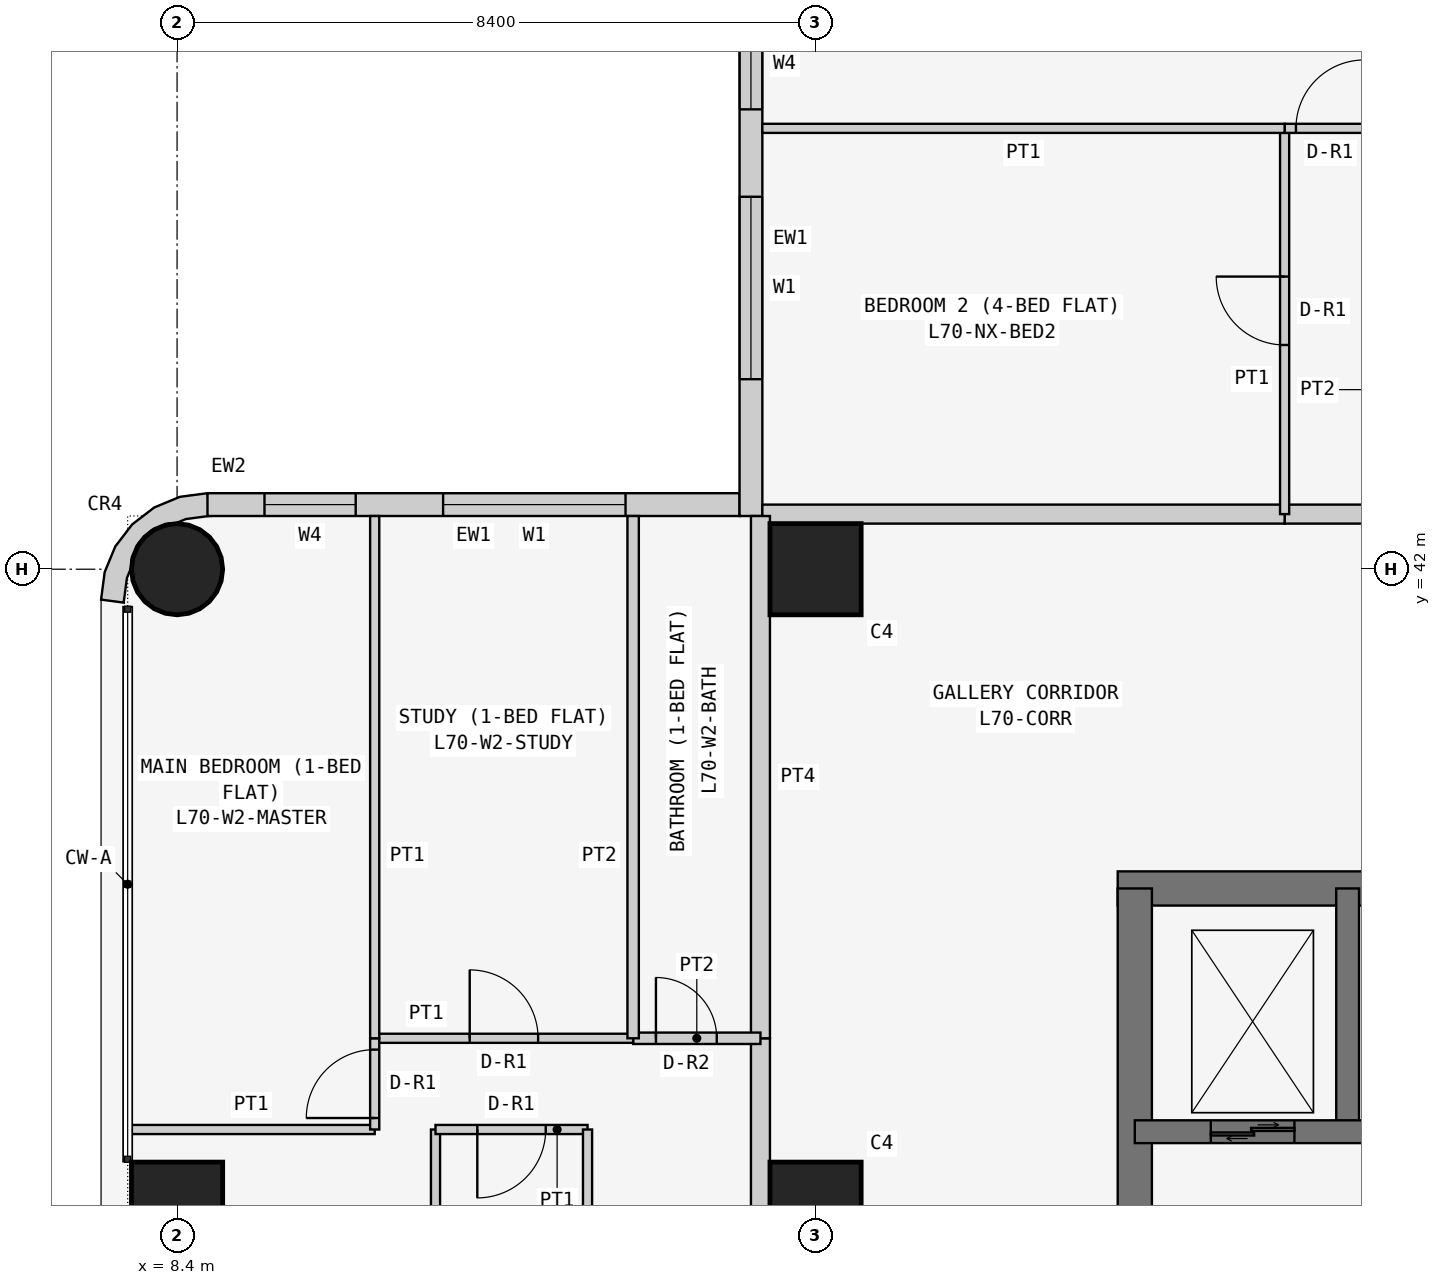
"""IFC4 building model, lengths in metres.
Left out: names, types, materials, properties, quantities, classifications, styles, units other than length and angle.
Written with IfcOpenShell. Run it as: python <this file> out.ifc"""

import sys

from ifc_helpers import new_model, si_unit, direction, frame, frame_2d, origin, origin_2d, place, context, subcontext, project, spatial, polyline, rectangle, circle, outline, extrude, element, fill, save


model = new_model("IFC4")
c1 = context("Model", 3, precision=1e-05, world=origin(), true_north=direction((0.0, 1.0)))
c2 = subcontext(c1, "Body", "Model", "MODEL_VIEW")
j1 = project(units=[si_unit("LENGTHUNIT", "METRE"), si_unit("PLANEANGLEUNIT", "RADIAN")], contexts=[c1])
p1 = place(None, origin())
s1 = spatial("IfcSite", under=j1, at=p1, CompositionType="ELEMENT")
p2 = place(p1, origin())
s2 = spatial("IfcBuilding", under=s1, at=p2, CompositionType="ELEMENT")
p3 = place(p2, frame((0.0, 0.0, 268.5)))
s3 = spatial("IfcBuildingStorey", under=s2, at=p3, CompositionType="ELEMENT", Elevation=268.5)
p4 = place(p3, frame((8.4, 33.6, 0.0), z_axis=(0.0, 0.0, 1.0), x_axis=(1.0, 0.0, 0.0)))
e1 = element("IfcColumn", 1, at=p4, inside=s3, PredefinedType="COLUMN", context=c2, shape_type="SweptSolid", body=[
    extrude(rectangle(XDim=1.2, YDim=1.2, at=origin_2d()), origin(), (0.0, 0.0, 1.0), 3.6),
])
p5 = place(p3, frame((8.4, 42.0, 0.0), z_axis=(0.0, 0.0, 1.0), x_axis=(1.0, 0.0, 0.0)))
e2 = element("IfcColumn", 2, at=p5, inside=s3, PredefinedType="COLUMN", context=c2, shape_type="SweptSolid", body=[
    extrude(circle(Radius=0.6, at=origin_2d()), origin(), (0.0, 0.0, 1.0), 3.6),
])
for number, where, z_axis, x_axis in (
    (3, (16.8, 33.6, 0.0), (0.0, 0.0, 1.0), (1.0, 0.0, 0.0)),
    (4, (16.8, 42.0, 0.0), (0.0, 0.0, 1.0), (1.0, 0.0, 0.0)),
):
    element("IfcColumn", number, at=place(p3, frame(where, z_axis=z_axis, x_axis=x_axis)), inside=s3, PredefinedType="COLUMN", context=c2, shape_type="SweptSolid", body=[
        extrude(rectangle(XDim=1.2, YDim=1.2, at=origin_2d()), origin(), (0.0, 0.0, 1.0), 3.6),
    ])
p6 = place(p3, frame((37.8, 37.8, 0.0), z_axis=(0.0, 0.0, 1.0), x_axis=(-1.0, 0.0, 0.0)))
e5 = element("IfcWall", 5, at=p6, inside=s3, PredefinedType="SHEAR", context=c2, shape_type="SweptSolid", body=[
    extrude(rectangle(XDim=17.025, YDim=0.45, at=frame_2d((8.513, 0.0))), origin(), (0.0, 0.0, 1.0), 3.6),
])
p7 = place(p3, frame((21.0, 37.8, 0.0), z_axis=(0.0, 0.0, 1.0), x_axis=(0.0, -1.0, 0.0)))
e6 = element("IfcWall", 6, at=p7, inside=s3, PredefinedType="SHEAR", context=c2, shape_type="SweptSolid", body=[
    extrude(rectangle(XDim=17.025, YDim=0.45, at=frame_2d((8.513, 0.0))), origin(), (0.0, 0.0, 1.0), 3.6),
])
p8 = place(p7, frame((5.4, 0.0, 0.0)))
e7 = element("IfcOpeningElement", 7, at=p8, cuts=e6, PredefinedType="OPENING", context=c2, shape_type="SweptSolid", body=[
    extrude(rectangle(XDim=1.2, YDim=2.1, at=frame_2d((0.6, 1.05))), frame((0.0, 0.235, 0.0), z_axis=(0.0, -1.0, 0.0), x_axis=(1.0, 0.0, 0.0)), (0.0, 0.0, 1.0), 0.47),
])
p9 = place(p3, frame((21.0, 34.6, 0.0), z_axis=(0.0, 0.0, 1.0), x_axis=(1.0, 0.0, 0.0)))
e8 = element("IfcWall", 8, at=p9, inside=s3, PredefinedType="SHEAR", context=c2, shape_type="SweptSolid", body=[
    extrude(rectangle(XDim=11.2, YDim=0.3, at=frame_2d((5.6, 0.0))), origin(), (0.0, 0.0, 1.0), 3.6),
])
p10 = place(p9, frame((9.35, 0.0, 0.0)))
e9 = element("IfcOpeningElement", 9, at=p10, cuts=e8, PredefinedType="OPENING", context=c2, shape_type="SweptSolid", body=[
    extrude(rectangle(XDim=0.9, YDim=2.1, at=frame_2d((0.45, 1.05))), frame((0.0, 0.16, 0.0), z_axis=(0.0, -1.0, 0.0), x_axis=(1.0, 0.0, 0.0)), (0.0, 0.0, 1.0), 0.32),
])
p11 = place(p9, frame((1.0, 0.0, 0.0)))
e10 = element("IfcOpeningElement", 10, at=p11, cuts=e8, PredefinedType="OPENING", context=c2, shape_type="SweptSolid", body=[
    extrude(rectangle(XDim=1.1, YDim=2.1, at=frame_2d((0.55, 1.05))), frame((0.0, 0.16, 0.0), z_axis=(0.0, -1.0, 0.0), x_axis=(1.0, 0.0, 0.0)), (0.0, 0.0, 1.0), 0.32),
])
p12 = place(p9, frame((3.65, 0.0, 0.0)))
e11 = element("IfcOpeningElement", 11, at=p12, cuts=e8, PredefinedType="OPENING", context=c2, shape_type="SweptSolid", body=[
    extrude(rectangle(XDim=1.1, YDim=2.1, at=frame_2d((0.55, 1.05))), frame((0.0, 0.16, 0.0), z_axis=(0.0, -1.0, 0.0), x_axis=(1.0, 0.0, 0.0)), (0.0, 0.0, 1.0), 0.32),
])
p13 = place(p9, frame((6.35, 0.0, 0.0)))
e12 = element("IfcOpeningElement", 12, at=p13, cuts=e8, PredefinedType="OPENING", context=c2, shape_type="SweptSolid", body=[
    extrude(rectangle(XDim=1.3, YDim=2.1, at=frame_2d((0.65, 1.05))), frame((0.0, 0.16, 0.0), z_axis=(0.0, -1.0, 0.0), x_axis=(1.0, 0.0, 0.0)), (0.0, 0.0, 1.0), 0.32),
])
p14 = place(p3, frame((23.8, 34.6, 0.0), z_axis=(0.0, 0.0, 1.0), x_axis=(0.0, 1.0, 0.0)))
e13 = element("IfcWall", 13, at=p14, inside=s3, PredefinedType="SHEAR", context=c2, shape_type="SweptSolid", body=[
    extrude(rectangle(XDim=3.2, YDim=0.3, at=frame_2d((1.6, 0.0))), origin(), (0.0, 0.0, 1.0), 3.6),
])
p15 = place(p3, frame((15.8, 42.85, 0.0), z_axis=(0.0, 0.0, 1.0), x_axis=(-1.0, 0.0, 0.0)))
e14 = element("IfcWall", 14, at=p15, inside=s3, PredefinedType="SOLIDWALL", context=c2, shape_type="SweptSolid", body=[
    extrude(rectangle(XDim=7.0, YDim=0.3, at=frame_2d((3.5, 0.0))), origin(), (0.0, 0.0, 1.0), 3.45),
])
p16 = place(p15, frame((1.5, 0.0, 0.9)))
e15 = element("IfcOpeningElement", 15, at=p16, cuts=e14, PredefinedType="OPENING", context=c2, shape_type="SweptSolid", body=[
    extrude(rectangle(XDim=2.4, YDim=1.5, at=frame_2d((1.2, 0.75))), frame((0.0, 0.16, 0.0), z_axis=(0.0, -1.0, 0.0), x_axis=(1.0, 0.0, 0.0)), (0.0, 0.0, 1.0), 0.32),
])
p17 = place(p15, frame((5.05, 0.0, 0.9)))
e16 = element("IfcOpeningElement", 16, at=p17, cuts=e14, PredefinedType="OPENING", context=c2, shape_type="SweptSolid", body=[
    extrude(rectangle(XDim=1.2, YDim=1.5, at=frame_2d((0.6, 0.75))), frame((0.0, 0.16, 0.0), z_axis=(0.0, -1.0, 0.0), x_axis=(1.0, 0.0, 0.0)), (0.0, 0.0, 1.0), 0.32),
])
p18 = place(p3, frame((15.95, 50.0, 0.0), z_axis=(0.0, 0.0, 1.0), x_axis=(0.0, -1.0, 0.0)))
e17 = element("IfcWall", 17, at=p18, inside=s3, PredefinedType="SOLIDWALL", context=c2, shape_type="SweptSolid", body=[
    extrude(rectangle(XDim=7.3, YDim=0.3, at=frame_2d((3.65, 0.0))), origin(), (0.0, 0.0, 1.0), 3.45),
])
p19 = place(p18, frame((3.1, 0.0, 0.9)))
e18 = element("IfcOpeningElement", 18, at=p19, cuts=e17, PredefinedType="OPENING", context=c2, shape_type="SweptSolid", body=[
    extrude(rectangle(XDim=2.4, YDim=1.5, at=frame_2d((1.2, 0.75))), frame((0.0, 0.16, 0.0), z_axis=(0.0, -1.0, 0.0), x_axis=(1.0, 0.0, 0.0)), (0.0, 0.0, 1.0), 0.32),
])
p20 = place(p18, frame((0.75, 0.0, 0.9)))
e19 = element("IfcOpeningElement", 19, at=p20, cuts=e17, PredefinedType="OPENING", context=c2, shape_type="SweptSolid", body=[
    extrude(rectangle(XDim=1.2, YDim=1.5, at=frame_2d((0.6, 0.75))), frame((0.0, 0.16, 0.0), z_axis=(0.0, -1.0, 0.0), x_axis=(1.0, 0.0, 0.0)), (0.0, 0.0, 1.0), 0.32),
])
p21 = place(p3, frame((8.762, 42.576, 0.0), z_axis=(0.0, 0.0, 1.0), x_axis=(-0.707106781187, 0.707106781187, 0.0)))
e20 = element("IfcWall", 20, at=p21, inside=s3, PredefinedType="SOLIDWALL", context=c2, shape_type="SweptSolid", body=[
    extrude(outline(polyline([(0.233, 0.114), (0.047, -0.129), (0.033, -0.143), (0.273, -0.327), (0.495, -0.037), (0.635, 0.3), (0.683, 0.663), (0.635, 1.025), (0.495, 1.363), (0.273, 1.653), (0.033, 1.469), (0.047, 1.455), (0.233, 1.212), (0.292, 1.069), (0.358, 1.003), (0.449, 0.783), (0.449, 0.543), (0.358, 0.322), (0.292, 0.257), (0.233, 0.114)])), origin(), (0.0, 0.0, 1.0), 3.45),
])
p22 = place(p3, frame((22.971, 42.725, 0.0), z_axis=(0.0, 0.0, 1.0), x_axis=(1.0, 0.0, 0.0)))
e21 = element("IfcWall", 21, at=p22, inside=s3, PredefinedType="PARTITIONING", context=c2, shape_type="SweptSolid", body=[
    extrude(rectangle(XDim=1.2, YDim=0.25, at=frame_2d((0.6, 0.0))), origin(), (0.0, 0.0, 1.0), 3.45),
])
p23 = place(p3, frame((16.1, 42.725, 0.0), z_axis=(0.0, 0.0, 1.0), x_axis=(1.0, 0.0, 0.0)))
e22 = element("IfcWall", 22, at=p23, inside=s3, PredefinedType="PARTITIONING", context=c2, shape_type="SweptSolid", body=[
    extrude(rectangle(XDim=6.871, YDim=0.25, at=frame_2d((3.436, 0.0))), origin(), (0.0, 0.0, 1.0), 3.45),
])
p24 = place(p3, frame((16.075, 29.4, 0.0), z_axis=(0.0, 0.0, 1.0), x_axis=(0.0, 1.0, 0.0)))
e23 = element("IfcWall", 23, at=p24, inside=s3, PredefinedType="PARTITIONING", context=c2, shape_type="SweptSolid", body=[
    extrude(rectangle(XDim=6.429, YDim=0.25, at=frame_2d((3.215, 0.0))), origin(), (0.0, 0.0, 1.0), 3.45),
])
p25 = place(p24, frame((0.5, 0.0, 0.0)))
e24 = element("IfcOpeningElement", 24, at=p25, cuts=e23, PredefinedType="OPENING", context=c2, shape_type="SweptSolid", body=[
    extrude(rectangle(XDim=1.0, YDim=2.1, at=frame_2d((0.5, 1.05))), frame((0.0, 0.135, 0.0), z_axis=(0.0, -1.0, 0.0), x_axis=(1.0, 0.0, 0.0)), (0.0, 0.0, 1.0), 0.27),
])
p26 = place(p3, frame((16.075, 35.829, 0.0), z_axis=(0.0, 0.0, 1.0), x_axis=(0.0, 1.0, 0.0)))
e25 = element("IfcWall", 25, at=p26, inside=s3, PredefinedType="PARTITIONING", context=c2, shape_type="SweptSolid", body=[
    extrude(rectangle(XDim=6.871, YDim=0.25, at=frame_2d((3.436, 0.0))), origin(), (0.0, 0.0, 1.0), 3.45),
])
p27 = place(p3, frame((22.971, 42.725, 0.0), z_axis=(0.0, 0.0, 1.0), x_axis=(0.0, 1.0, 0.0)))
e26 = element("IfcWall", 26, at=p27, inside=s3, PredefinedType="PARTITIONING", context=c2, shape_type="SweptSolid", body=[
    extrude(rectangle(XDim=5.075, YDim=0.12, at=frame_2d((2.538, 0.0))), origin(), (0.0, 0.0, 1.0), 3.45),
])
p28 = place(p27, frame((2.225, 0.0, 0.0)))
e27 = element("IfcOpeningElement", 27, at=p28, cuts=e26, PredefinedType="OPENING", context=c2, shape_type="SweptSolid", body=[
    extrude(rectangle(XDim=0.9, YDim=2.1, at=frame_2d((0.45, 1.05))), frame((0.0, 0.07, 0.0), z_axis=(0.0, -1.0, 0.0), x_axis=(1.0, 0.0, 0.0)), (0.0, 0.0, 1.0), 0.14),
])
p29 = place(p3, frame((22.971, 47.8, 0.0), z_axis=(0.0, 0.0, 1.0), x_axis=(1.0, 0.0, 0.0)))
e28 = element("IfcWall", 28, at=p29, inside=s3, PredefinedType="PARTITIONING", context=c2, shape_type="SweptSolid", body=[
    extrude(rectangle(XDim=1.2, YDim=0.12, at=frame_2d((0.6, 0.0))), origin(), (0.0, 0.0, 1.0), 3.45),
])
p30 = place(p29, frame((0.149, 0.0, 0.0)))
e29 = element("IfcOpeningElement", 29, at=p30, cuts=e28, PredefinedType="OPENING", context=c2, shape_type="SweptSolid", body=[
    extrude(rectangle(XDim=0.9, YDim=2.1, at=frame_2d((0.45, 1.05))), frame((0.0, 0.07, 0.0), z_axis=(0.0, -1.0, 0.0), x_axis=(1.0, 0.0, 0.0)), (0.0, 0.0, 1.0), 0.14),
])
p31 = place(p3, frame((22.971, 47.8, 0.0), z_axis=(0.0, 0.0, 1.0), x_axis=(-1.0, 0.0, 0.0)))
e30 = element("IfcWall", 30, at=p31, inside=s3, PredefinedType="PARTITIONING", context=c2, shape_type="SweptSolid", body=[
    extrude(rectangle(XDim=6.871, YDim=0.12, at=frame_2d((3.436, 0.0))), origin(), (0.0, 0.0, 1.0), 3.45),
])
p32 = place(p3, frame((11.8, 29.4, 0.0), z_axis=(0.0, 0.0, 1.0), x_axis=(0.0, 1.0, 0.0)))
e31 = element("IfcWall", 31, at=p32, inside=s3, PredefinedType="PARTITIONING", context=c2, shape_type="SweptSolid", body=[
    extrude(rectangle(XDim=5.229, YDim=0.12, at=frame_2d((2.615, 0.0))), origin(), (0.0, 0.0, 1.0), 3.45),
])
p33 = place(p3, frame((11.8, 34.629, 0.0), z_axis=(0.0, 0.0, 1.0), x_axis=(1.0, 0.0, 0.0)))
e32 = element("IfcWall", 32, at=p33, inside=s3, PredefinedType="PARTITIONING", context=c2, shape_type="SweptSolid", body=[
    extrude(rectangle(XDim=2.0, YDim=0.12, at=frame_2d((1.0, 0.0))), origin(), (0.0, 0.0, 1.0), 3.45),
])
p34 = place(p33, frame((0.55, 0.0, 0.0)))
e33 = element("IfcOpeningElement", 33, at=p34, cuts=e32, PredefinedType="OPENING", context=c2, shape_type="SweptSolid", body=[
    extrude(rectangle(XDim=0.9, YDim=2.1, at=frame_2d((0.45, 1.05))), frame((0.0, 0.07, 0.0), z_axis=(0.0, -1.0, 0.0), x_axis=(1.0, 0.0, 0.0)), (0.0, 0.0, 1.0), 0.14),
])
p35 = place(p3, frame((13.8, 34.629, 0.0), z_axis=(0.0, 0.0, 1.0), x_axis=(0.0, -1.0, 0.0)))
e34 = element("IfcWall", 34, at=p35, inside=s3, PredefinedType="PARTITIONING", context=c2, shape_type="SweptSolid", body=[
    extrude(rectangle(XDim=5.229, YDim=0.12, at=frame_2d((2.615, 0.0))), origin(), (0.0, 0.0, 1.0), 3.45),
])
p36 = place(p3, frame((14.4, 35.829, 0.0), z_axis=(0.0, 0.0, 1.0), x_axis=(1.0, 0.0, 0.0)))
e35 = element("IfcWall", 35, at=p36, inside=s3, PredefinedType="PARTITIONING", context=c2, shape_type="SweptSolid", body=[
    extrude(rectangle(XDim=1.675, YDim=0.15, at=frame_2d((0.837, 0.0))), origin(), (0.0, 0.0, 1.0), 3.45),
])
p37 = place(p36, frame((0.3, 0.0, 0.0)))
e36 = element("IfcOpeningElement", 36, at=p37, cuts=e35, PredefinedType="OPENING", context=c2, shape_type="SweptSolid", body=[
    extrude(rectangle(XDim=0.8, YDim=2.1, at=frame_2d((0.4, 1.05))), frame((0.0, 0.085, 0.0), z_axis=(0.0, -1.0, 0.0), x_axis=(1.0, 0.0, 0.0)), (0.0, 0.0, 1.0), 0.17),
])
p38 = place(p3, frame((11.0, 35.829, 0.0), z_axis=(0.0, 0.0, 1.0), x_axis=(1.0, 0.0, 0.0)))
e37 = element("IfcWall", 37, at=p38, inside=s3, PredefinedType="PARTITIONING", context=c2, shape_type="SweptSolid", body=[
    extrude(rectangle(XDim=3.4, YDim=0.12, at=frame_2d((1.7, 0.0))), origin(), (0.0, 0.0, 1.0), 3.45),
])
p39 = place(p38, frame((1.25, 0.0, 0.0)))
e38 = element("IfcOpeningElement", 38, at=p39, cuts=e37, PredefinedType="OPENING", context=c2, shape_type="SweptSolid", body=[
    extrude(rectangle(XDim=0.9, YDim=2.1, at=frame_2d((0.45, 1.05))), frame((0.0, 0.07, 0.0), z_axis=(0.0, -1.0, 0.0), x_axis=(1.0, 0.0, 0.0)), (0.0, 0.0, 1.0), 0.14),
])
p40 = place(p3, frame((7.75, 34.629, 0.0), z_axis=(0.0, 0.0, 1.0), x_axis=(1.0, 0.0, 0.0)))
e39 = element("IfcWall", 39, at=p40, inside=s3, PredefinedType="PARTITIONING", context=c2, shape_type="SweptSolid", body=[
    extrude(rectangle(XDim=3.25, YDim=0.12, at=frame_2d((1.625, 0.0))), origin(), (0.0, 0.0, 1.0), 3.45),
])
p41 = place(p3, frame((11.0, 34.629, 0.0), z_axis=(0.0, 0.0, 1.0), x_axis=(0.0, 1.0, 0.0)))
e40 = element("IfcWall", 40, at=p41, inside=s3, PredefinedType="PARTITIONING", context=c2, shape_type="SweptSolid", body=[
    extrude(rectangle(XDim=1.2, YDim=0.12, at=frame_2d((0.6, 0.0))), origin(), (0.0, 0.0, 1.0), 3.45),
])
p42 = place(p41, frame((0.151, 0.0, 0.0)))
e41 = element("IfcOpeningElement", 41, at=p42, cuts=e40, PredefinedType="OPENING", context=c2, shape_type="SweptSolid", body=[
    extrude(rectangle(XDim=0.9, YDim=2.1, at=frame_2d((0.45, 1.05))), frame((0.0, 0.07, 0.0), z_axis=(0.0, -1.0, 0.0), x_axis=(1.0, 0.0, 0.0)), (0.0, 0.0, 1.0), 0.14),
])
p43 = place(p3, frame((14.4, 35.829, 0.0), z_axis=(0.0, 0.0, 1.0), x_axis=(0.0, 1.0, 0.0)))
e42 = element("IfcWall", 42, at=p43, inside=s3, PredefinedType="PARTITIONING", context=c2, shape_type="SweptSolid", body=[
    extrude(rectangle(XDim=6.871, YDim=0.15, at=frame_2d((3.436, 0.0))), origin(), (0.0, 0.0, 1.0), 3.45),
])
p44 = place(p3, frame((11.0, 35.829, 0.0), z_axis=(0.0, 0.0, 1.0), x_axis=(0.0, 1.0, 0.0)))
e43 = element("IfcWall", 43, at=p44, inside=s3, PredefinedType="PARTITIONING", context=c2, shape_type="SweptSolid", body=[
    extrude(rectangle(XDim=6.871, YDim=0.12, at=frame_2d((3.436, 0.0))), origin(), (0.0, 0.0, 1.0), 3.45),
])
p45 = place(p19, origin())
e44 = element("IfcWindow", 44, at=p45, inside=s3, PartitioningType="SINGLE_PANEL", PredefinedType="WINDOW", context=c2, shape_type="SweptSolid", body=[
    extrude(rectangle(XDim=2.4, YDim=1.5, at=frame_2d((1.2, 0.75))), frame((0.0, 0.03, 0.0), z_axis=(0.0, -1.0, 0.0), x_axis=(1.0, 0.0, 0.0)), (0.0, 0.0, 1.0), 0.06),
])
fill(e18, e44)
p46 = place(p20, origin())
e45 = element("IfcWindow", 45, at=p46, inside=s3, PartitioningType="SINGLE_PANEL", PredefinedType="WINDOW", context=c2, shape_type="SweptSolid", body=[
    extrude(rectangle(XDim=1.2, YDim=1.5, at=frame_2d((0.6, 0.75))), frame((0.0, 0.03, 0.0), z_axis=(0.0, -1.0, 0.0), x_axis=(1.0, 0.0, 0.0)), (0.0, 0.0, 1.0), 0.06),
])
fill(e19, e45)
p47 = place(p16, origin())
e46 = element("IfcWindow", 46, at=p47, inside=s3, PartitioningType="SINGLE_PANEL", PredefinedType="WINDOW", context=c2, shape_type="SweptSolid", body=[
    extrude(rectangle(XDim=2.4, YDim=1.5, at=frame_2d((1.2, 0.75))), frame((0.0, 0.03, 0.0), z_axis=(0.0, -1.0, 0.0), x_axis=(1.0, 0.0, 0.0)), (0.0, 0.0, 1.0), 0.06),
])
fill(e15, e46)
p48 = place(p17, origin())
e47 = element("IfcWindow", 47, at=p48, inside=s3, PartitioningType="SINGLE_PANEL", PredefinedType="WINDOW", context=c2, shape_type="SweptSolid", body=[
    extrude(rectangle(XDim=1.2, YDim=1.5, at=frame_2d((0.6, 0.75))), frame((0.0, 0.03, 0.0), z_axis=(0.0, -1.0, 0.0), x_axis=(1.0, 0.0, 0.0)), (0.0, 0.0, 1.0), 0.06),
])
fill(e16, e47)
p49 = place(p28, origin())
e48 = element("IfcDoor", 48, at=p49, inside=s3, OperationType="SINGLE_SWING_RIGHT", PredefinedType="DOOR", context=c2, shape_type="SweptSolid", body=[
    extrude(rectangle(XDim=0.9, YDim=2.1, at=frame_2d((0.45, 1.05))), frame((0.0, 0.025, 0.0), z_axis=(0.0, -1.0, 0.0), x_axis=(1.0, 0.0, 0.0)), (0.0, 0.0, 1.0), 0.05),
])
fill(e27, e48)
p50 = place(p30, origin())
e49 = element("IfcDoor", 49, at=p50, inside=s3, OperationType="SINGLE_SWING_RIGHT", PredefinedType="DOOR", context=c2, shape_type="SweptSolid", body=[
    extrude(rectangle(XDim=0.9, YDim=2.1, at=frame_2d((0.45, 1.05))), frame((0.0, 0.025, 0.0), z_axis=(0.0, -1.0, 0.0), x_axis=(1.0, 0.0, 0.0)), (0.0, 0.0, 1.0), 0.05),
])
fill(e29, e49)
p51 = place(p34, frame((0.9, 0.0, 0.0), z_axis=(0.0, 0.0, 1.0), x_axis=(-1.0, 0.0, 0.0)))
e50 = element("IfcDoor", 50, at=p51, inside=s3, OperationType="SINGLE_SWING_RIGHT", PredefinedType="DOOR", context=c2, shape_type="SweptSolid", body=[
    extrude(rectangle(XDim=0.9, YDim=2.1, at=frame_2d((0.45, 1.05))), frame((0.0, 0.025, 0.0), z_axis=(0.0, -1.0, 0.0), x_axis=(1.0, 0.0, 0.0)), (0.0, 0.0, 1.0), 0.05),
])
fill(e33, e50)
p52 = place(p37, origin())
e51 = element("IfcDoor", 51, at=p52, inside=s3, OperationType="SINGLE_SWING_LEFT", PredefinedType="DOOR", context=c2, shape_type="SweptSolid", body=[
    extrude(rectangle(XDim=0.8, YDim=2.1, at=frame_2d((0.4, 1.05))), frame((0.0, 0.025, 0.0), z_axis=(0.0, -1.0, 0.0), x_axis=(1.0, 0.0, 0.0)), (0.0, 0.0, 1.0), 0.05),
])
fill(e36, e51)
p53 = place(p39, origin())
e52 = element("IfcDoor", 52, at=p53, inside=s3, OperationType="SINGLE_SWING_LEFT", PredefinedType="DOOR", context=c2, shape_type="SweptSolid", body=[
    extrude(rectangle(XDim=0.9, YDim=2.1, at=frame_2d((0.45, 1.05))), frame((0.0, 0.025, 0.0), z_axis=(0.0, -1.0, 0.0), x_axis=(1.0, 0.0, 0.0)), (0.0, 0.0, 1.0), 0.05),
])
fill(e38, e52)
p54 = place(p42, origin())
e53 = element("IfcDoor", 53, at=p54, inside=s3, OperationType="SINGLE_SWING_LEFT", PredefinedType="DOOR", context=c2, shape_type="SweptSolid", body=[
    extrude(rectangle(XDim=0.9, YDim=2.1, at=frame_2d((0.45, 1.05))), frame((0.0, 0.025, 0.0), z_axis=(0.0, -1.0, 0.0), x_axis=(1.0, 0.0, 0.0)), (0.0, 0.0, 1.0), 0.05),
])
fill(e41, e53)
p55 = place(p11, origin())
e54 = element("IfcDoor", 54, at=p55, inside=s3, OperationType="DOUBLE_DOOR_SLIDING", PredefinedType="DOOR", context=c2, shape_type="SweptSolid", body=[
    extrude(rectangle(XDim=1.1, YDim=2.1, at=frame_2d((0.55, 1.05))), frame((0.0, 0.025, 0.0), z_axis=(0.0, -1.0, 0.0), x_axis=(1.0, 0.0, 0.0)), (0.0, 0.0, 1.0), 0.05),
])
fill(e10, e54)
save(model, sys.argv[1])
